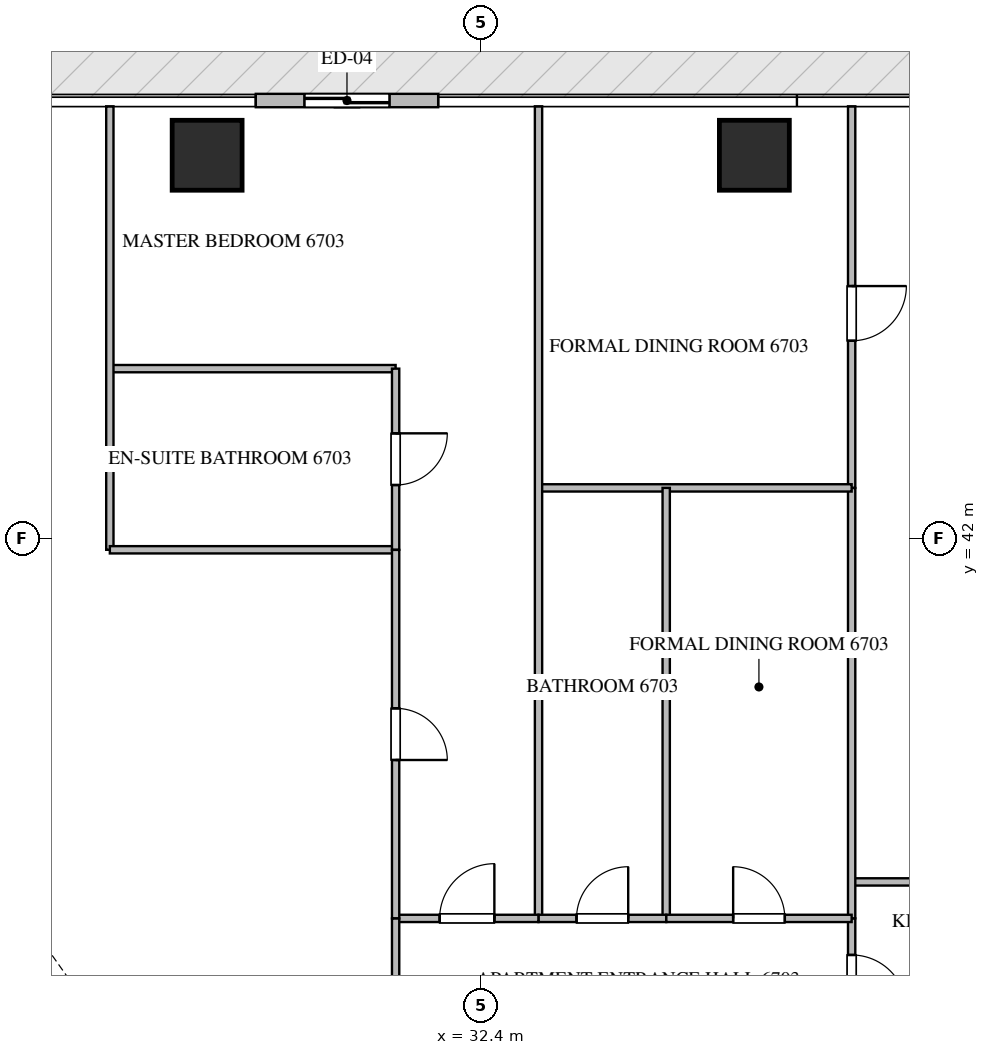
"""IFC4 building model, lengths in metres.
Left out: names, types, materials, properties, quantities, classifications, styles, units other than length and angle.
Written with IfcOpenShell. Run it as: python <this file> out.ifc"""

import sys

from ifc_helpers import new_model, si_unit, direction, frame, frame_2d, origin, origin_2d, place, context, subcontext, project, spatial, rectangle, extrude, source, transform, mapped, element, fill, save


model = new_model("IFC4")
c1 = context("Model", 3, precision=1e-05, world=origin(), true_north=direction((0.0, 1.0)))
c2 = subcontext(c1, "Body", "Model", "MODEL_VIEW")
j1 = project(units=[si_unit("LENGTHUNIT", "METRE"), si_unit("PLANEANGLEUNIT", "RADIAN")], contexts=[c1])
p1 = place(None, origin())
s1 = spatial("IfcSite", under=j1, at=p1, CompositionType="ELEMENT")
p2 = place(p1, origin())
s2 = spatial("IfcBuilding", under=s1, at=p2, CompositionType="ELEMENT")
p3 = place(p2, frame((0.0, 0.0, 268.2)))
s3 = spatial("IfcBuildingStorey", under=s2, at=p3, CompositionType="ELEMENT", Elevation=268.2)
m1 = source(origin(), c2, "Body", "SweptSolid", [
    extrude(rectangle(XDim=1.15, YDim=1.15, at=origin_2d()), origin(), (0.0, 0.0, 1.0), 3.85),
])
for number, where, z_axis, x_axis in (
    (1, (27.9, 48.3, -0.26), (0.0, 0.0, 1.0), (1.0, 0.0, 0.0)),
    (2, (36.9, 48.3, -0.26), (0.0, 0.0, 1.0), (1.0, 0.0, 0.0)),
):
    element("IfcColumn", number, at=place(p3, frame(where, z_axis=z_axis, x_axis=x_axis)), inside=s3, PredefinedType="COLUMN", context=c2, shape_type="MappedRepresentation", body=[
        mapped(m1, transform((0.0, 0.0, 0.0), scale=1.0)),
    ])
p4 = place(p3, frame((31.7, 49.2, 0.0), z_axis=(0.0, 0.0, 1.0), x_axis=(-1.0, 0.0, 0.0)))
e3 = element("IfcWall", 3, at=p4, inside=s3, PredefinedType="ELEMENTEDWALL", context=c2, shape_type="SweptSolid", body=[
    extrude(rectangle(XDim=3.0, YDim=0.22, at=frame_2d((1.5, 0.0))), origin(), (0.0, 0.0, 1.0), 3.575),
])
p5 = place(p4, frame((0.8, 0.0, 0.0)))
e4 = element("IfcOpeningElement", 4, at=p5, cuts=e3, PredefinedType="OPENING", context=c2, shape_type="SweptSolid", body=[
    extrude(rectangle(XDim=1.4, YDim=2.25, at=frame_2d((0.7, 1.125))), frame((0.0, 0.12, 0.0), z_axis=(0.0, -1.0, 0.0), x_axis=(1.0, 0.0, 0.0)), (0.0, 0.0, 1.0), 0.24),
])
p6 = place(p3, frame((38.5, 36.35, 0.0), z_axis=(0.0, 0.0, 1.0), x_axis=(1.0, 0.0, 0.0)))
e5 = element("IfcWall", 5, at=p6, inside=s3, PredefinedType="PARTITIONING", context=c2, shape_type="SweptSolid", body=[
    extrude(rectangle(XDim=2.85, YDim=0.12, at=frame_2d((1.425, 0.0))), origin(), (0.0, 0.0, 1.0), 3.59),
])
p7 = place(p6, frame((1.0, 0.0, 0.0)))
e6 = element("IfcOpeningElement", 6, at=p7, cuts=e5, PredefinedType="OPENING", context=c2, shape_type="SweptSolid", body=[
    extrude(rectangle(XDim=0.85, YDim=2.1, at=frame_2d((0.425, 1.05))), frame((0.0, 0.07, 0.0), z_axis=(0.0, -1.0, 0.0), x_axis=(1.0, 0.0, 0.0)), (0.0, 0.0, 1.0), 0.14),
])
p8 = place(p3, frame((38.5, 35.75, 0.0), z_axis=(0.0, 0.0, 1.0), x_axis=(0.0, -1.0, 0.0)))
e7 = element("IfcWall", 7, at=p8, inside=s3, PredefinedType="PARTITIONING", context=c2, shape_type="SweptSolid", body=[
    extrude(rectangle(XDim=1.975, YDim=0.12, at=frame_2d((0.988, 0.0))), origin(), (0.0, 0.0, 1.0), 3.59),
])
p9 = place(p8, frame((0.601, 0.0, 0.0)))
e8 = element("IfcOpeningElement", 8, at=p9, cuts=e7, PredefinedType="OPENING", context=c2, shape_type="SweptSolid", body=[
    extrude(rectangle(XDim=0.9, YDim=2.1, at=frame_2d((0.45, 1.05))), frame((0.0, 0.07, 0.0), z_axis=(0.0, -1.0, 0.0), x_axis=(1.0, 0.0, 0.0)), (0.0, 0.0, 1.0), 0.14),
])
p10 = place(p3, frame((38.5, 49.105, 0.0), z_axis=(0.0, 0.0, 1.0), x_axis=(0.0, -1.0, 0.0)))
e9 = element("IfcWall", 9, at=p10, inside=s3, PredefinedType="PARTITIONING", context=c2, shape_type="SweptSolid", body=[
    extrude(rectangle(XDim=6.275, YDim=0.12, at=frame_2d((3.137, 0.0))), origin(), (0.0, 0.0, 1.0), 3.59),
])
p11 = place(p10, frame((2.956, 0.0, 0.0)))
e10 = element("IfcOpeningElement", 10, at=p11, cuts=e9, PredefinedType="OPENING", context=c2, shape_type="SweptSolid", body=[
    extrude(rectangle(XDim=0.9, YDim=2.1, at=frame_2d((0.45, 1.05))), frame((0.0, 0.07, 0.0), z_axis=(0.0, -1.0, 0.0), x_axis=(1.0, 0.0, 0.0)), (0.0, 0.0, 1.0), 0.14),
])
p12 = place(p3, frame((38.5, 42.828, 0.0), z_axis=(0.0, 0.0, 1.0), x_axis=(0.0, -1.0, 0.0)))
e11 = element("IfcWall", 11, at=p12, inside=s3, PredefinedType="PARTITIONING", context=c2, shape_type="SweptSolid", body=[
    extrude(rectangle(XDim=7.076, YDim=0.12, at=frame_2d((3.538, 0.0))), origin(), (0.0, 0.0, 1.0), 3.59),
])
p13 = place(p3, frame((33.35, 42.83, 0.0), z_axis=(0.0, 0.0, 1.0), x_axis=(1.0, 0.0, 0.0)))
e12 = element("IfcWall", 12, at=p13, inside=s3, PredefinedType="PARTITIONING", context=c2, shape_type="SweptSolid", body=[
    extrude(rectangle(XDim=5.15, YDim=0.12, at=frame_2d((2.575, 0.0))), origin(), (0.0, 0.0, 1.0), 3.59),
])
p14 = place(p3, frame((33.35, 49.105, 0.0), z_axis=(0.0, 0.0, 1.0), x_axis=(0.0, -1.0, 0.0)))
e13 = element("IfcWall", 13, at=p14, inside=s3, PredefinedType="PARTITIONING", context=c2, shape_type="SweptSolid", body=[
    extrude(rectangle(XDim=13.355, YDim=0.12, at=frame_2d((6.677, 0.0))), origin(), (0.0, 0.0, 1.0), 3.59),
])
p15 = place(p3, frame((35.45, 42.83, 0.0), z_axis=(0.0, 0.0, 1.0), x_axis=(0.0, -1.0, 0.0)))
e14 = element("IfcWall", 14, at=p15, inside=s3, PredefinedType="PARTITIONING", context=c2, shape_type="SweptSolid", body=[
    extrude(rectangle(XDim=7.08, YDim=0.12, at=frame_2d((3.54, 0.0))), origin(), (0.0, 0.0, 1.0), 3.59),
])
p16 = place(p3, frame((33.35, 35.75, 0.0), z_axis=(0.0, 0.0, 1.0), x_axis=(1.0, 0.0, 0.0)))
e15 = element("IfcWall", 15, at=p16, inside=s3, PredefinedType="PARTITIONING", context=c2, shape_type="SweptSolid", body=[
    extrude(rectangle(XDim=2.1, YDim=0.12, at=frame_2d((1.05, 0.0))), origin(), (0.0, 0.0, 1.0), 3.59),
])
p17 = place(p16, frame((0.625, 0.0, 0.0)))
e16 = element("IfcOpeningElement", 16, at=p17, cuts=e15, PredefinedType="OPENING", context=c2, shape_type="SweptSolid", body=[
    extrude(rectangle(XDim=0.85, YDim=2.1, at=frame_2d((0.425, 1.05))), frame((0.0, 0.07, 0.0), z_axis=(0.0, -1.0, 0.0), x_axis=(1.0, 0.0, 0.0)), (0.0, 0.0, 1.0), 0.14),
])
p18 = place(p3, frame((35.452, 35.75, 0.0), z_axis=(0.0, 0.0, 1.0), x_axis=(1.0, 0.0, 0.0)))
e17 = element("IfcWall", 17, at=p18, inside=s3, PredefinedType="PARTITIONING", context=c2, shape_type="SweptSolid", body=[
    extrude(rectangle(XDim=3.048, YDim=0.12, at=frame_2d((1.524, 0.0))), origin(), (0.0, 0.0, 1.0), 3.59),
])
p19 = place(p18, frame((1.099, 0.0, 0.0)))
e18 = element("IfcOpeningElement", 18, at=p19, cuts=e17, PredefinedType="OPENING", context=c2, shape_type="SweptSolid", body=[
    extrude(rectangle(XDim=0.85, YDim=2.1, at=frame_2d((0.425, 1.05))), frame((0.0, 0.07, 0.0), z_axis=(0.0, -1.0, 0.0), x_axis=(1.0, 0.0, 0.0)), (0.0, 0.0, 1.0), 0.14),
])
p20 = place(p3, frame((31.0, 35.75, 0.0), z_axis=(0.0, 0.0, 1.0), x_axis=(1.0, 0.0, 0.0)))
e19 = element("IfcWall", 19, at=p20, inside=s3, PredefinedType="PARTITIONING", context=c2, shape_type="SweptSolid", body=[
    extrude(rectangle(XDim=2.348, YDim=0.12, at=frame_2d((1.174, 0.0))), origin(), (0.0, 0.0, 1.0), 3.59),
])
p21 = place(p20, frame((0.724, 0.0, 0.0)))
e20 = element("IfcOpeningElement", 20, at=p21, cuts=e19, PredefinedType="OPENING", context=c2, shape_type="SweptSolid", body=[
    extrude(rectangle(XDim=0.9, YDim=2.1, at=frame_2d((0.45, 1.05))), frame((0.0, 0.07, 0.0), z_axis=(0.0, -1.0, 0.0), x_axis=(1.0, 0.0, 0.0)), (0.0, 0.0, 1.0), 0.14),
])
p22 = place(p3, frame((26.3, 44.791, 0.0), z_axis=(0.0, 0.0, 1.0), x_axis=(1.0, 0.0, 0.0)))
e21 = element("IfcWall", 21, at=p22, inside=s3, PredefinedType="PARTITIONING", context=c2, shape_type="SweptSolid", body=[
    extrude(rectangle(XDim=4.7, YDim=0.12, at=frame_2d((2.35, 0.0))), origin(), (0.0, 0.0, 1.0), 3.59),
])
p23 = place(p3, frame((26.3, 49.105, 0.0), z_axis=(0.0, 0.0, 1.0), x_axis=(0.0, -1.0, 0.0)))
e22 = element("IfcWall", 22, at=p23, inside=s3, PredefinedType="PARTITIONING", context=c2, shape_type="SweptSolid", body=[
    extrude(rectangle(XDim=7.293, YDim=0.12, at=frame_2d((3.646, 0.0))), origin(), (0.0, 0.0, 1.0), 3.59),
])
p24 = place(p3, frame((26.3, 41.812, 0.0), z_axis=(0.0, 0.0, 1.0), x_axis=(1.0, 0.0, 0.0)))
e23 = element("IfcWall", 23, at=p24, inside=s3, PredefinedType="PARTITIONING", context=c2, shape_type="SweptSolid", body=[
    extrude(rectangle(XDim=4.7, YDim=0.12, at=frame_2d((2.35, 0.0))), origin(), (0.0, 0.0, 1.0), 3.59),
])
p25 = place(p3, frame((31.0, 44.791, 0.0), z_axis=(0.0, 0.0, 1.0), x_axis=(0.0, -1.0, 0.0)))
e24 = element("IfcWall", 24, at=p25, inside=s3, PredefinedType="PARTITIONING", context=c2, shape_type="SweptSolid", body=[
    extrude(rectangle(XDim=2.979, YDim=0.12, at=frame_2d((1.49, 0.0))), origin(), (0.0, 0.0, 1.0), 3.59),
])
p26 = place(p25, frame((1.064, 0.0, 0.0)))
e25 = element("IfcOpeningElement", 25, at=p26, cuts=e24, PredefinedType="OPENING", context=c2, shape_type="SweptSolid", body=[
    extrude(rectangle(XDim=0.85, YDim=2.1, at=frame_2d((0.425, 1.05))), frame((0.0, 0.07, 0.0), z_axis=(0.0, -1.0, 0.0), x_axis=(1.0, 0.0, 0.0)), (0.0, 0.0, 1.0), 0.14),
])
p27 = place(p3, frame((31.0, 41.81, 0.0), z_axis=(0.0, 0.0, 1.0), x_axis=(0.0, -1.0, 0.0)))
e26 = element("IfcWall", 26, at=p27, inside=s3, PredefinedType="PARTITIONING", context=c2, shape_type="SweptSolid", body=[
    extrude(rectangle(XDim=6.06, YDim=0.12, at=frame_2d((3.03, 0.0))), origin(), (0.0, 0.0, 1.0), 3.59),
])
p28 = place(p27, frame((2.605, 0.0, 0.0)))
e27 = element("IfcOpeningElement", 27, at=p28, cuts=e26, PredefinedType="OPENING", context=c2, shape_type="SweptSolid", body=[
    extrude(rectangle(XDim=0.85, YDim=2.1, at=frame_2d((0.425, 1.05))), frame((0.0, 0.07, 0.0), z_axis=(0.0, -1.0, 0.0), x_axis=(1.0, 0.0, 0.0)), (0.0, 0.0, 1.0), 0.14),
])
p29 = place(p3, frame((31.0, 35.748, 0.0), z_axis=(0.0, 0.0, 1.0), x_axis=(0.0, -1.0, 0.0)))
e28 = element("IfcWall", 28, at=p29, inside=s3, PredefinedType="PARTITIONING", context=c2, shape_type="SweptSolid", body=[
    extrude(rectangle(XDim=1.973, YDim=0.12, at=frame_2d((0.987, 0.0))), origin(), (0.0, 0.0, 1.0), 3.59),
])
m2 = source(origin(), c2, "Body", "SweptSolid", [
    extrude(rectangle(XDim=1.4, YDim=2.25, at=frame_2d((0.7, 1.125))), frame((0.0, 0.025, 0.0), z_axis=(0.0, -1.0, 0.0), x_axis=(1.0, 0.0, 0.0)), (0.0, 0.0, 1.0), 0.05),
])
p30 = place(p5, origin())
e29 = element("IfcDoor", 29, at=p30, inside=s3, OperationType="SLIDING_TO_LEFT", PredefinedType="DOOR", context=c2, shape_type="MappedRepresentation", body=[
    mapped(m2, transform((0.0, 0.0, 0.0), scale=1.0)),
])
fill(e4, e29)
m3 = source(origin(), c2, "Body", "SweptSolid", [
    extrude(rectangle(XDim=0.9, YDim=2.1, at=frame_2d((0.45, 1.05))), frame((0.0, 0.025, 0.0), z_axis=(0.0, -1.0, 0.0), x_axis=(1.0, 0.0, 0.0)), (0.0, 0.0, 1.0), 0.05),
])
p31 = place(p9, origin())
e30 = element("IfcDoor", 30, at=p31, inside=s3, OperationType="SINGLE_SWING_RIGHT", PredefinedType="DOOR", context=c2, shape_type="MappedRepresentation", body=[
    mapped(m3, transform((0.0, 0.0, 0.0), scale=1.0)),
])
fill(e8, e30)
p32 = place(p11, origin())
e31 = element("IfcDoor", 31, at=p32, inside=s3, OperationType="SINGLE_SWING_LEFT", PredefinedType="DOOR", context=c2, shape_type="MappedRepresentation", body=[
    mapped(m3, transform((0.0, 0.0, 0.0), scale=1.0)),
])
fill(e10, e31)
m4 = source(origin(), c2, "Body", "SweptSolid", [
    extrude(rectangle(XDim=0.85, YDim=2.1, at=frame_2d((0.425, 1.05))), frame((0.0, 0.025, 0.0), z_axis=(0.0, -1.0, 0.0), x_axis=(1.0, 0.0, 0.0)), (0.0, 0.0, 1.0), 0.05),
])
p33 = place(p17, origin())
e32 = element("IfcDoor", 32, at=p33, inside=s3, OperationType="SINGLE_SWING_RIGHT", PredefinedType="DOOR", context=c2, shape_type="MappedRepresentation", body=[
    mapped(m4, transform((0.0, 0.0, 0.0), scale=1.0)),
])
fill(e16, e32)
p34 = place(p19, origin())
e33 = element("IfcDoor", 33, at=p34, inside=s3, OperationType="SINGLE_SWING_LEFT", PredefinedType="DOOR", context=c2, shape_type="MappedRepresentation", body=[
    mapped(m4, transform((0.0, 0.0, 0.0), scale=1.0)),
])
fill(e18, e33)
p35 = place(p21, origin())
e34 = element("IfcDoor", 34, at=p35, inside=s3, OperationType="SINGLE_SWING_RIGHT", PredefinedType="DOOR", context=c2, shape_type="MappedRepresentation", body=[
    mapped(m3, transform((0.0, 0.0, 0.0), scale=1.0)),
])
fill(e20, e34)
p36 = place(p26, origin())
e35 = element("IfcDoor", 35, at=p36, inside=s3, OperationType="SINGLE_SWING_LEFT", PredefinedType="DOOR", context=c2, shape_type="MappedRepresentation", body=[
    mapped(m4, transform((0.0, 0.0, 0.0), scale=1.0)),
])
fill(e25, e35)
p37 = place(p28, origin())
e36 = element("IfcDoor", 36, at=p37, inside=s3, OperationType="SINGLE_SWING_RIGHT", PredefinedType="DOOR", context=c2, shape_type="MappedRepresentation", body=[
    mapped(m4, transform((0.0, 0.0, 0.0), scale=1.0)),
])
fill(e27, e36)
save(model, sys.argv[1])
